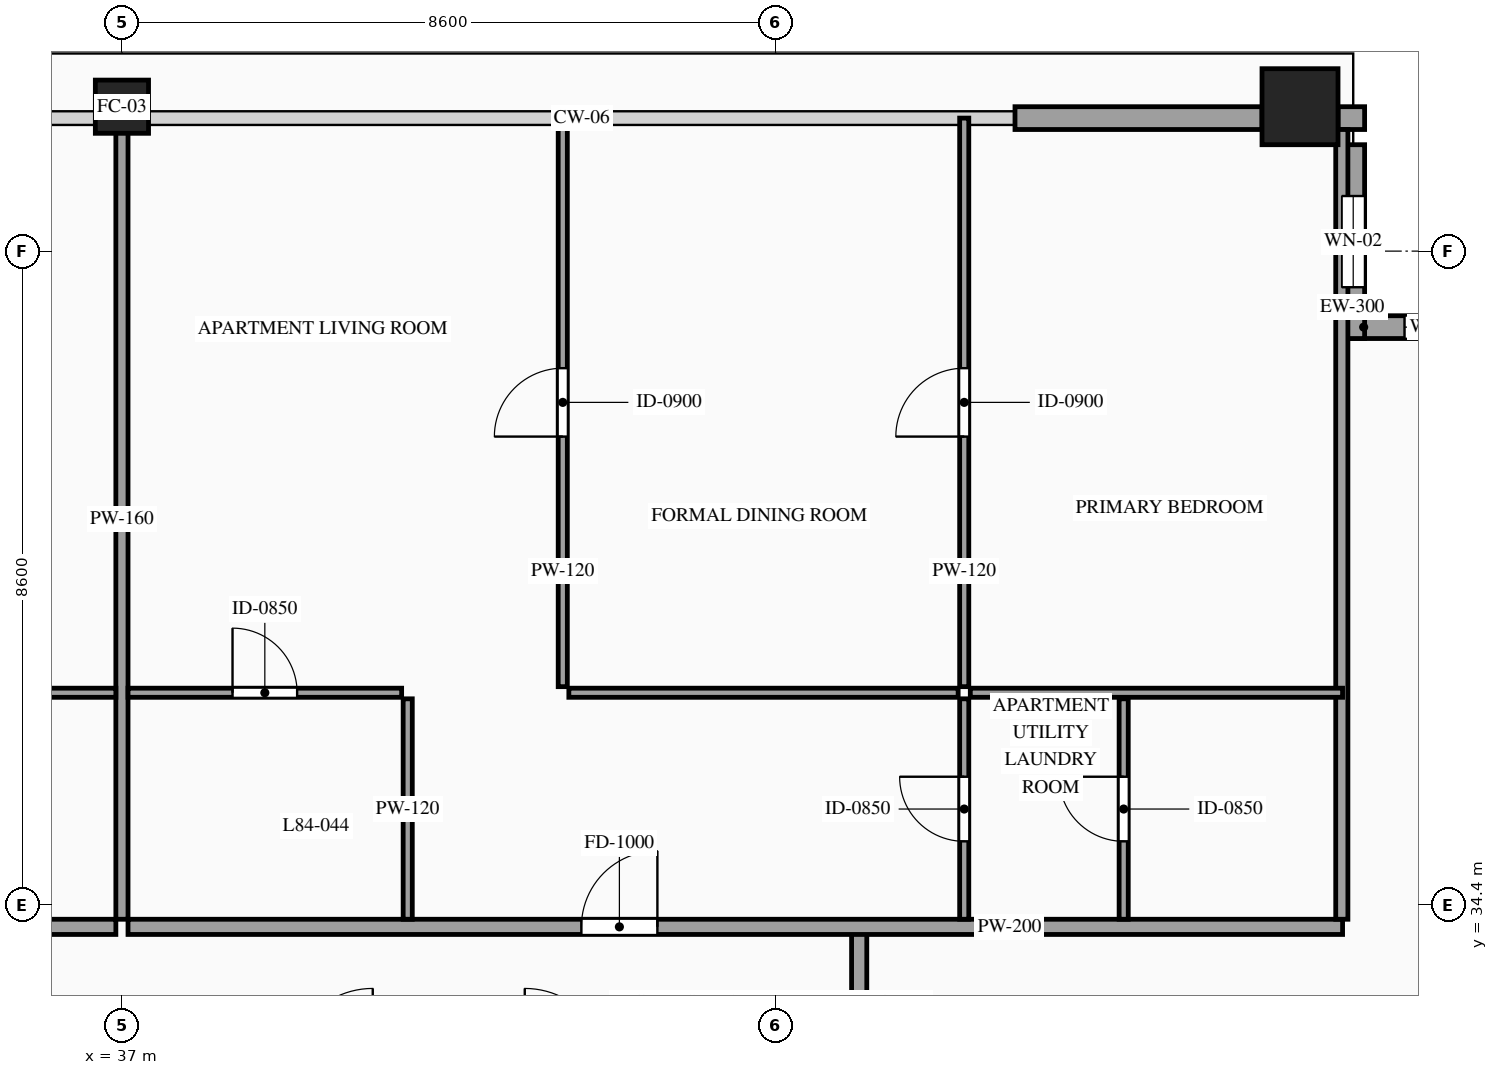
"""IFC4 building model, lengths in metres.
Left out: names, types, materials, properties, quantities, classifications, styles, units other than length and angle.
Written with IfcOpenShell. Run it as: python <this file> out.ifc"""

import sys

from ifc_helpers import new_model, si_unit, direction, frame, frame_2d, origin, origin_2d, place, context, subcontext, project, spatial, rectangle, hollow_rectangle, extrude, source, transform, mapped, element, fill, save


model = new_model("IFC4")
c1 = context("Model", 3, precision=1e-05, world=origin(), true_north=direction((0.0, 1.0)))
c2 = subcontext(c1, "Body", "Model", "MODEL_VIEW")
j1 = project(units=[si_unit("LENGTHUNIT", "METRE"), si_unit("PLANEANGLEUNIT", "RADIAN")], contexts=[c1])
p1 = place(None, origin())
s1 = spatial("IfcSite", under=j1, at=p1, CompositionType="ELEMENT")
p2 = place(p1, origin())
s2 = spatial("IfcBuilding", under=s1, at=p2, CompositionType="ELEMENT")
p3 = place(p2, frame((0.0, 0.0, 314.7)))
s3 = spatial("IfcBuildingStorey", under=s2, at=p3, CompositionType="ELEMENT", Elevation=314.7)
m1 = source(origin(), c2, "Body", "SweptSolid", [
    extrude(hollow_rectangle(XDim=0.7, YDim=0.7, WallThickness=0.032, at=origin_2d()), origin(), (0.0, 0.0, 1.0), 3.5),
])
p4 = place(p3, frame((37.0, 44.9, 0.0), z_axis=(0.0, 0.0, 1.0), x_axis=(1.0, 0.0, 0.0)))
e1 = element("IfcColumn", 1, at=p4, inside=s3, PredefinedType="COLUMN", context=c2, shape_type="MappedRepresentation", body=[
    mapped(m1, transform((0.0, 0.0, 0.0), scale=1.0)),
])
m2 = source(origin(), c2, "Body", "SweptSolid", [
    extrude(hollow_rectangle(XDim=1.0, YDim=1.0, WallThickness=0.048, at=origin_2d()), origin(), (0.0, 0.0, 1.0), 3.5),
])
p5 = place(p3, frame((52.5, 44.9, 0.0), z_axis=(0.0, 0.0, 1.0), x_axis=(1.0, 0.0, 0.0)))
e2 = element("IfcColumn", 2, at=p5, inside=s3, PredefinedType="COLUMN", context=c2, shape_type="MappedRepresentation", body=[
    mapped(m2, transform((0.0, 0.0, 0.0), scale=1.0)),
])
p6 = place(p3, frame((55.6, 42.0, 0.0), z_axis=(0.0, 0.0, 1.0), x_axis=(-1.0, 0.0, 0.0)))
e3 = element("IfcWall", 3, at=p6, inside=s3, PredefinedType="SOLIDWALL", context=c2, shape_type="SweptSolid", body=[
    extrude(rectangle(XDim=2.55, YDim=0.3, at=frame_2d((1.275, 0.0))), origin(), (0.0, 0.0, 1.0), 3.28),
])
p7 = place(p6, frame((0.825, 0.0, 0.85)))
e4 = element("IfcOpeningElement", 4, at=p7, cuts=e3, PredefinedType="OPENING", context=c2, shape_type="SweptSolid", body=[
    extrude(rectangle(XDim=0.9, YDim=1.5, at=frame_2d((0.45, 0.75))), frame((0.0, 0.165, 0.0), z_axis=(0.0, -1.0, 0.0), x_axis=(1.0, 0.0, 0.0)), (0.0, 0.0, 1.0), 0.33),
])
p8 = place(p3, frame((53.2, 41.85, 0.0), z_axis=(0.0, 0.0, 1.0), x_axis=(0.0, 1.0, 0.0)))
e5 = element("IfcWall", 5, at=p8, inside=s3, PredefinedType="SOLIDWALL", context=c2, shape_type="SweptSolid", body=[
    extrude(rectangle(XDim=2.55, YDim=0.3, at=frame_2d((1.275, 0.0))), origin(), (0.0, 0.0, 1.0), 3.28),
])
p9 = place(p8, frame((0.675, 0.0, 0.85)))
e6 = element("IfcOpeningElement", 6, at=p9, cuts=e5, PredefinedType="OPENING", context=c2, shape_type="SweptSolid", body=[
    extrude(rectangle(XDim=1.2, YDim=2.1, at=frame_2d((0.6, 1.05))), frame((0.0, 0.165, 0.0), z_axis=(0.0, -1.0, 0.0), x_axis=(1.0, 0.0, 0.0)), (0.0, 0.0, 1.0), 0.33),
])
m3 = source(origin(), c2, "Body", "SweptSolid", [
    extrude(rectangle(XDim=0.35, YDim=0.3, at=frame_2d((0.175, 0.0))), origin(), (0.0, 0.0, 1.0), 3.28),
])
p10 = place(p3, frame((53.0, 44.75, 0.0), z_axis=(0.0, 0.0, 1.0), x_axis=(1.0, 0.0, 0.0)))
e7 = element("IfcWall", 7, at=p10, inside=s3, PredefinedType="SOLIDWALL", context=c2, shape_type="MappedRepresentation", body=[
    mapped(m3, transform((0.0, 0.0, 0.0), scale=1.0)),
])
m4 = source(origin(), c2, "Body", "SweptSolid", [
    extrude(rectangle(XDim=3.25, YDim=0.3, at=frame_2d((1.625, 0.0))), origin(), (0.0, 0.0, 1.0), 2.885),
])
p11 = place(p3, frame((48.75, 44.75, 0.0), z_axis=(0.0, 0.0, 1.0), x_axis=(1.0, 0.0, 0.0)))
e8 = element("IfcWall", 8, at=p11, inside=s3, PredefinedType="SOLIDWALL", context=c2, shape_type="MappedRepresentation", body=[
    mapped(m4, transform((0.0, 0.0, 0.0), scale=1.0)),
])
m5 = source(origin(), c2, "Body", "SweptSolid", [
    extrude(rectangle(XDim=1.7, YDim=0.2, at=frame_2d((0.85, 0.0))), origin(), (0.0, 0.0, 1.0), 3.28),
])
p12 = place(p3, frame((46.7, 32.35, 0.0), z_axis=(0.0, 0.0, 1.0), x_axis=(0.0, 1.0, 0.0)))
e9 = element("IfcWall", 9, at=p12, inside=s3, PredefinedType="PARTITIONING", context=c2, shape_type="MappedRepresentation", body=[
    mapped(m5, transform((0.0, 0.0, 0.0), scale=1.0)),
])
p13 = place(p3, frame((20.94, 34.11, 0.0), z_axis=(0.0, 0.0, 1.0), x_axis=(1.0, 0.0, 0.0)))
e10 = element("IfcWall", 10, at=p13, inside=s3, PredefinedType="PARTITIONING", context=c2, shape_type="SweptSolid", body=[
    extrude(rectangle(XDim=15.98, YDim=0.2, at=frame_2d((7.99, 0.0))), origin(), (0.0, 0.0, 1.0), 3.28),
])
p14 = place(p13, frame((6.841, 0.0, 0.0)))
e11 = element("IfcOpeningElement", 11, at=p14, cuts=e10, PredefinedType="OPENING", context=c2, shape_type="SweptSolid", body=[
    extrude(rectangle(XDim=1.0, YDim=2.2, at=frame_2d((0.5, 1.1))), frame((0.0, 0.115, 0.0), z_axis=(0.0, -1.0, 0.0), x_axis=(1.0, 0.0, 0.0)), (0.0, 0.0, 1.0), 0.23),
])
m6 = source(origin(), c2, "Body", "SweptSolid", [
    extrude(rectangle(XDim=10.54, YDim=0.16, at=frame_2d((5.27, 0.0))), origin(), (0.0, 0.0, 1.0), 2.787),
])
p15 = place(p3, frame((37.0, 34.21, 0.0), z_axis=(0.0, 0.0, 1.0), x_axis=(0.0, 1.0, 0.0)))
e12 = element("IfcWall", 12, at=p15, inside=s3, PredefinedType="PARTITIONING", context=c2, shape_type="MappedRepresentation", body=[
    mapped(m6, transform((0.0, 0.0, 0.0), scale=1.0)),
])
m7 = source(origin(), c2, "Body", "SweptSolid", [
    extrude(rectangle(XDim=4.898, YDim=0.12, at=frame_2d((2.449, 0.0))), origin(), (0.0, 0.0, 1.0), 3.28),
])
p16 = place(p3, frame((32.022, 37.19, 0.0), z_axis=(0.0, 0.0, 1.0), x_axis=(1.0, 0.0, 0.0)))
e13 = element("IfcWall", 13, at=p16, inside=s3, PredefinedType="PARTITIONING", context=c2, shape_type="MappedRepresentation", body=[
    mapped(m7, transform((0.0, 0.0, 0.0), scale=1.0)),
])
p17 = place(p3, frame((37.08, 34.11, 0.0), z_axis=(0.0, 0.0, 1.0), x_axis=(1.0, 0.0, 0.0)))
e14 = element("IfcWall", 14, at=p17, inside=s3, PredefinedType="PARTITIONING", context=c2, shape_type="SweptSolid", body=[
    extrude(rectangle(XDim=15.98, YDim=0.2, at=frame_2d((7.99, 0.0))), origin(), (0.0, 0.0, 1.0), 3.28),
])
p18 = place(p17, frame((5.965, 0.0, 0.0)))
e15 = element("IfcOpeningElement", 15, at=p18, cuts=e14, PredefinedType="OPENING", context=c2, shape_type="SweptSolid", body=[
    extrude(rectangle(XDim=1.0, YDim=2.2, at=frame_2d((0.5, 1.1))), frame((0.0, 0.115, 0.0), z_axis=(0.0, -1.0, 0.0), x_axis=(1.0, 0.0, 0.0)), (0.0, 0.0, 1.0), 0.23),
])
m8 = source(origin(), c2, "Body", "SweptSolid", [
    extrude(rectangle(XDim=10.39, YDim=0.16, at=frame_2d((5.195, 0.0))), origin(), (0.0, 0.0, 1.0), 3.28),
])
p19 = place(p3, frame((53.05, 34.21, 0.0), z_axis=(0.0, 0.0, 1.0), x_axis=(0.0, 1.0, 0.0)))
e16 = element("IfcWall", 16, at=p19, inside=s3, PredefinedType="PARTITIONING", context=c2, shape_type="MappedRepresentation", body=[
    mapped(m8, transform((0.0, 0.0, 0.0), scale=1.0)),
])
p20 = place(p3, frame((37.08, 37.19, 0.0), z_axis=(0.0, 0.0, 1.0), x_axis=(1.0, 0.0, 0.0)))
e17 = element("IfcWall", 17, at=p20, inside=s3, PredefinedType="PARTITIONING", context=c2, shape_type="SweptSolid", body=[
    extrude(rectangle(XDim=3.6, YDim=0.12, at=frame_2d((1.8, 0.0))), origin(), (0.0, 0.0, 1.0), 3.28),
])
p21 = place(p20, frame((1.375, 0.0, 0.0)))
e18 = element("IfcOpeningElement", 18, at=p21, cuts=e17, PredefinedType="OPENING", context=c2, shape_type="SweptSolid", body=[
    extrude(rectangle(XDim=0.85, YDim=2.1, at=frame_2d((0.425, 1.05))), frame((0.0, 0.075, 0.0), z_axis=(0.0, -1.0, 0.0), x_axis=(1.0, 0.0, 0.0)), (0.0, 0.0, 1.0), 0.15),
])
m9 = source(origin(), c2, "Body", "SweptSolid", [
    extrude(rectangle(XDim=2.9, YDim=0.12, at=frame_2d((1.45, 0.0))), origin(), (0.0, 0.0, 1.0), 3.28),
])
p22 = place(p3, frame((40.76, 34.21, 0.0), z_axis=(0.0, 0.0, 1.0), x_axis=(0.0, 1.0, 0.0)))
e19 = element("IfcWall", 19, at=p22, inside=s3, PredefinedType="PARTITIONING", context=c2, shape_type="MappedRepresentation", body=[
    mapped(m9, transform((0.0, 0.0, 0.0), scale=1.0)),
])
p23 = place(p3, frame((50.18, 34.21, 0.0), z_axis=(0.0, 0.0, 1.0), x_axis=(0.0, 1.0, 0.0)))
e20 = element("IfcWall", 20, at=p23, inside=s3, PredefinedType="PARTITIONING", context=c2, shape_type="SweptSolid", body=[
    extrude(rectangle(XDim=2.9, YDim=0.12, at=frame_2d((1.45, 0.0))), origin(), (0.0, 0.0, 1.0), 2.825),
])
p24 = place(p23, frame((1.025, 0.0, 0.0)))
e21 = element("IfcOpeningElement", 21, at=p24, cuts=e20, PredefinedType="OPENING", context=c2, shape_type="SweptSolid", body=[
    extrude(rectangle(XDim=0.85, YDim=2.1, at=frame_2d((0.425, 1.05))), frame((0.0, 0.075, 0.0), z_axis=(0.0, -1.0, 0.0), x_axis=(1.0, 0.0, 0.0)), (0.0, 0.0, 1.0), 0.15),
])
p25 = place(p3, frame((48.162, 37.19, 0.0), z_axis=(0.0, 0.0, 1.0), x_axis=(1.0, 0.0, 0.0)))
e22 = element("IfcWall", 22, at=p25, inside=s3, PredefinedType="PARTITIONING", context=c2, shape_type="MappedRepresentation", body=[
    mapped(m7, transform((0.0, 0.0, 0.0), scale=1.0)),
])
p26 = place(p3, frame((48.082, 37.27, 0.0), z_axis=(0.0, 0.0, 1.0), x_axis=(0.0, 1.0, 0.0)))
e23 = element("IfcWall", 23, at=p26, inside=s3, PredefinedType="PARTITIONING", context=c2, shape_type="SweptSolid", body=[
    extrude(rectangle(XDim=7.48, YDim=0.12, at=frame_2d((3.74, 0.0))), origin(), (0.0, 0.0, 1.0), 3.28),
])
p27 = place(p26, frame((3.29, 0.0, 0.0)))
e24 = element("IfcOpeningElement", 24, at=p27, cuts=e23, PredefinedType="OPENING", context=c2, shape_type="SweptSolid", body=[
    extrude(rectangle(XDim=0.9, YDim=2.15, at=frame_2d((0.45, 1.075))), frame((0.0, 0.075, 0.0), z_axis=(0.0, -1.0, 0.0), x_axis=(1.0, 0.0, 0.0)), (0.0, 0.0, 1.0), 0.15),
])
p28 = place(p3, frame((48.082, 34.21, 0.0), z_axis=(0.0, 0.0, 1.0), x_axis=(0.0, 1.0, 0.0)))
e25 = element("IfcWall", 25, at=p28, inside=s3, PredefinedType="PARTITIONING", context=c2, shape_type="SweptSolid", body=[
    extrude(rectangle(XDim=2.9, YDim=0.12, at=frame_2d((1.45, 0.0))), origin(), (0.0, 0.0, 1.0), 3.28),
])
p29 = place(p28, frame((1.025, 0.0, 0.0)))
e26 = element("IfcOpeningElement", 26, at=p29, cuts=e25, PredefinedType="OPENING", context=c2, shape_type="SweptSolid", body=[
    extrude(rectangle(XDim=0.85, YDim=2.1, at=frame_2d((0.425, 1.05))), frame((0.0, 0.075, 0.0), z_axis=(0.0, -1.0, 0.0), x_axis=(1.0, 0.0, 0.0)), (0.0, 0.0, 1.0), 0.15),
])
m10 = source(origin(), c2, "Body", "SweptSolid", [
    extrude(rectangle(XDim=5.122, YDim=0.12, at=frame_2d((2.561, 0.0))), origin(), (0.0, 0.0, 1.0), 3.28),
])
p30 = place(p3, frame((42.88, 37.19, 0.0), z_axis=(0.0, 0.0, 1.0), x_axis=(1.0, 0.0, 0.0)))
e27 = element("IfcWall", 27, at=p30, inside=s3, PredefinedType="PARTITIONING", context=c2, shape_type="MappedRepresentation", body=[
    mapped(m10, transform((0.0, 0.0, 0.0), scale=1.0)),
])
p31 = place(p3, frame((42.8, 37.27, 0.0), z_axis=(0.0, 0.0, 1.0), x_axis=(0.0, 1.0, 0.0)))
e28 = element("IfcWall", 28, at=p31, inside=s3, PredefinedType="PARTITIONING", context=c2, shape_type="SweptSolid", body=[
    extrude(rectangle(XDim=7.48, YDim=0.12, at=frame_2d((3.74, 0.0))), origin(), (0.0, 0.0, 1.0), 3.28),
])
p32 = place(p31, frame((3.29, 0.0, 0.0)))
e29 = element("IfcOpeningElement", 29, at=p32, cuts=e28, PredefinedType="OPENING", context=c2, shape_type="SweptSolid", body=[
    extrude(rectangle(XDim=0.9, YDim=2.15, at=frame_2d((0.45, 1.075))), frame((0.0, 0.075, 0.0), z_axis=(0.0, -1.0, 0.0), x_axis=(1.0, 0.0, 0.0)), (0.0, 0.0, 1.0), 0.15),
])
m11 = source(origin(), c2, "Body", "SweptSolid", [
    extrude(rectangle(XDim=0.9, YDim=1.5, at=frame_2d((0.45, 0.75))), frame((0.0, 0.03, 0.0), z_axis=(0.0, -1.0, 0.0), x_axis=(1.0, 0.0, 0.0)), (0.0, 0.0, 1.0), 0.06),
])
p33 = place(p7, origin())
e30 = element("IfcWindow", 30, at=p33, inside=s3, PartitioningType="SINGLE_PANEL", PredefinedType="WINDOW", context=c2, shape_type="MappedRepresentation", body=[
    mapped(m11, transform((0.0, 0.0, 0.0), scale=1.0)),
])
fill(e4, e30)
m12 = source(origin(), c2, "Body", "SweptSolid", [
    extrude(rectangle(XDim=1.2, YDim=2.1, at=frame_2d((0.6, 1.05))), frame((0.0, 0.03, 0.0), z_axis=(0.0, -1.0, 0.0), x_axis=(1.0, 0.0, 0.0)), (0.0, 0.0, 1.0), 0.06),
])
p34 = place(p9, origin())
e31 = element("IfcWindow", 31, at=p34, inside=s3, PartitioningType="SINGLE_PANEL", PredefinedType="WINDOW", context=c2, shape_type="MappedRepresentation", body=[
    mapped(m12, transform((0.0, 0.0, 0.0), scale=1.0)),
])
fill(e6, e31)
m13 = source(origin(), c2, "Body", "SweptSolid", [
    extrude(rectangle(XDim=1.0, YDim=2.2, at=frame_2d((0.5, 1.1))), frame((0.0, 0.025, 0.0), z_axis=(0.0, -1.0, 0.0), x_axis=(1.0, 0.0, 0.0)), (0.0, 0.0, 1.0), 0.05),
])
p35 = place(p18, origin())
e32 = element("IfcDoor", 32, at=p35, inside=s3, OperationType="SINGLE_SWING_RIGHT", PredefinedType="DOOR", context=c2, shape_type="MappedRepresentation", body=[
    mapped(m13, transform((0.0, 0.0, 0.0), scale=1.0)),
])
fill(e15, e32)
m14 = source(origin(), c2, "Body", "SweptSolid", [
    extrude(rectangle(XDim=0.85, YDim=2.1, at=frame_2d((0.425, 1.05))), frame((0.0, 0.025, 0.0), z_axis=(0.0, -1.0, 0.0), x_axis=(1.0, 0.0, 0.0)), (0.0, 0.0, 1.0), 0.05),
])
p36 = place(p21, origin())
e33 = element("IfcDoor", 33, at=p36, inside=s3, OperationType="SINGLE_SWING_LEFT", PredefinedType="DOOR", context=c2, shape_type="MappedRepresentation", body=[
    mapped(m14, transform((0.0, 0.0, 0.0), scale=1.0)),
])
fill(e18, e33)
p37 = place(p24, origin())
e34 = element("IfcDoor", 34, at=p37, inside=s3, OperationType="SINGLE_SWING_RIGHT", PredefinedType="DOOR", context=c2, shape_type="MappedRepresentation", body=[
    mapped(m14, transform((0.0, 0.0, 0.0), scale=1.0)),
])
fill(e21, e34)
m15 = source(origin(), c2, "Body", "SweptSolid", [
    extrude(rectangle(XDim=0.9, YDim=2.15, at=frame_2d((0.45, 1.075))), frame((0.0, 0.025, 0.0), z_axis=(0.0, -1.0, 0.0), x_axis=(1.0, 0.0, 0.0)), (0.0, 0.0, 1.0), 0.05),
])
p38 = place(p27, origin())
e35 = element("IfcDoor", 35, at=p38, inside=s3, OperationType="SINGLE_SWING_LEFT", PredefinedType="DOOR", context=c2, shape_type="MappedRepresentation", body=[
    mapped(m15, transform((0.0, 0.0, 0.0), scale=1.0)),
])
fill(e24, e35)
p39 = place(p29, origin())
e36 = element("IfcDoor", 36, at=p39, inside=s3, OperationType="SINGLE_SWING_RIGHT", PredefinedType="DOOR", context=c2, shape_type="MappedRepresentation", body=[
    mapped(m14, transform((0.0, 0.0, 0.0), scale=1.0)),
])
fill(e26, e36)
p40 = place(p32, origin())
e37 = element("IfcDoor", 37, at=p40, inside=s3, OperationType="SINGLE_SWING_LEFT", PredefinedType="DOOR", context=c2, shape_type="MappedRepresentation", body=[
    mapped(m15, transform((0.0, 0.0, 0.0), scale=1.0)),
])
fill(e29, e37)
save(model, sys.argv[1])
